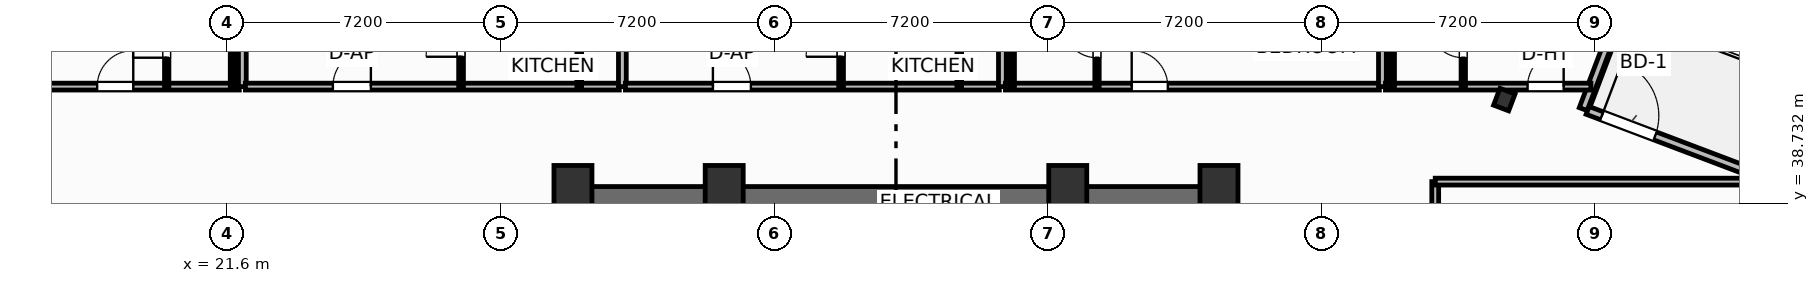
"""IFC4 building model, lengths in metres.
Left out: names, types, materials, properties, quantities, classifications, styles, units other than length and angle.
Written with IfcOpenShell. Run it as: python <this file> out.ifc"""

import sys

from ifc_helpers import new_model, si_unit, direction, frame, frame_2d, origin, origin_2d, place, context, subcontext, project, spatial, rectangle, i_section, extrude, element, fill, save


model = new_model("IFC4")
c1 = context("Model", 3, precision=1e-05, world=origin(), true_north=direction((0.0, 1.0)))
c2 = subcontext(c1, "Body", "Model", "MODEL_VIEW")
j1 = project(units=[si_unit("LENGTHUNIT", "METRE"), si_unit("PLANEANGLEUNIT", "RADIAN")], contexts=[c1])
p1 = place(None, origin())
s1 = spatial("IfcSite", under=j1, at=p1, CompositionType="ELEMENT")
p2 = place(p1, origin())
s2 = spatial("IfcBuilding", under=s1, at=p2, CompositionType="ELEMENT")
p3 = place(p2, frame((0.0, 0.0, 98.4)))
s3 = spatial("IfcBuildingStorey", under=s2, at=p3, CompositionType="ELEMENT", Elevation=98.4)
for number, where, z_axis, x_axis in (
    (1, (30.7, 39.05, 0.0), (0.0, 0.0, 1.0), (1.0, 0.0, 0.0)),
    (2, (34.68, 39.05, 0.0), (0.0, 0.0, 1.0), (1.0, 0.0, 0.0)),
    (3, (43.72, 39.05, 0.0), (0.0, 0.0, 1.0), (1.0, 0.0, 0.0)),
    (4, (47.7, 39.05, 0.0), (0.0, 0.0, 1.0), (1.0, 0.0, 0.0)),
):
    element("IfcColumn", number, at=place(p3, frame(where, z_axis=z_axis, x_axis=x_axis)), inside=s3, PredefinedType="COLUMN", context=c2, shape_type="SweptSolid", body=[
        extrude(rectangle(XDim=1.0, YDim=1.35, at=origin_2d()), origin(), (0.0, 0.0, 1.0), 3.7),
    ])
p4 = place(p3, frame((30.38, 38.795, 0.0), z_axis=(0.0, 0.0, 1.0), x_axis=(1.0, 0.0, 0.0)))
e5 = element("IfcWall", 5, at=p4, inside=s3, PredefinedType="SHEAR", context=c2, shape_type="SweptSolid", body=[
    extrude(rectangle(XDim=17.64, YDim=0.75, at=frame_2d((8.82, 0.0))), origin(), (0.0, 0.0, 1.0), 3.45),
])
p5 = place(p3, frame((55.208, 41.459, 0.0), z_axis=(0.0, 0.0, 1.0), x_axis=(0.935221751401, -0.354062530786, 0.0)))
e6 = element("IfcColumn", 6, at=p5, inside=s3, PredefinedType="COLUMN", context=c2, shape_type="SweptSolid", body=[
    extrude(i_section(OverallWidth=0.424, OverallDepth=0.474, WebThickness=0.048, FlangeThickness=0.077, FilletRadius=0.025, at=origin_2d()), origin(), (0.0, 0.0, 1.0), 3.7),
])
p6 = place(p3, frame((57.399, 41.175, 0.0), z_axis=(0.0, 0.0, 1.0), x_axis=(0.935227640088, -0.354046976001, 0.0)))
e7 = element("IfcWall", 7, at=p6, inside=s3, PredefinedType="SOLIDWALL", context=c2, shape_type="SweptSolid", body=[
    extrude(rectangle(XDim=6.0, YDim=0.22, at=frame_2d((3.0, 0.0))), origin(), (0.0, 0.0, 1.0), 2.73),
])
p7 = place(p6, frame((0.4, 0.0, 0.0)))
e8 = element("IfcOpeningElement", 8, at=p7, cuts=e7, PredefinedType="OPENING", context=c2, shape_type="SweptSolid", body=[
    extrude(rectangle(XDim=1.5, YDim=2.25, at=frame_2d((0.75, 1.125))), frame((0.0, 0.12, 0.0), z_axis=(0.0, -1.0, 0.0), x_axis=(1.0, 0.0, 0.0)), (0.0, 0.0, 1.0), 0.24),
])
p8 = place(p3, frame((57.284, 41.208, 0.0), z_axis=(0.0, 0.0, 1.0), x_axis=(0.354128469405, 0.935196785258, 0.0)))
e9 = element("IfcWall", 9, at=p8, inside=s3, PredefinedType="SOLIDWALL", context=c2, shape_type="SweptSolid", body=[
    extrude(rectangle(XDim=2.1, YDim=0.22, at=frame_2d((1.05, 0.0))), origin(), (0.0, 0.0, 1.0), 2.73),
])
p9 = place(p3, frame((5.646, 41.8, 0.0), z_axis=(0.0, 0.0, 1.0), x_axis=(1.0, 0.0, 0.0)))
e10 = element("IfcWall", 10, at=p9, inside=s3, PredefinedType="PARTITIONING", context=c2, shape_type="SweptSolid", body=[
    extrude(rectangle(XDim=16.274, YDim=0.18, at=frame_2d((8.137, 0.0))), origin(), (0.0, 0.0, 1.0), 3.45),
])
p10 = place(p9, frame((12.534, 0.0, 0.0)))
e11 = element("IfcOpeningElement", 11, at=p10, cuts=e10, PredefinedType="OPENING", context=c2, shape_type="SweptSolid", body=[
    extrude(rectangle(XDim=0.95, YDim=2.15, at=frame_2d((0.475, 1.075))), frame((0.0, 0.1, 0.0), z_axis=(0.0, -1.0, 0.0), x_axis=(1.0, 0.0, 0.0)), (0.0, 0.0, 1.0), 0.2),
])
p11 = place(p3, frame((20.01, 41.8, 0.0), z_axis=(0.0, 0.0, 1.0), x_axis=(0.0, 1.0, 0.0)))
e12 = element("IfcWall", 12, at=p11, inside=s3, PredefinedType="PARTITIONING", context=c2, shape_type="SweptSolid", body=[
    extrude(rectangle(XDim=2.52, YDim=0.115, at=frame_2d((1.26, 0.0))), origin(), (0.0, 0.0, 1.0), 3.45),
])
p12 = place(p11, frame((0.76, 0.0, 0.0)))
e13 = element("IfcOpeningElement", 13, at=p12, cuts=e12, PredefinedType="OPENING", context=c2, shape_type="SweptSolid", body=[
    extrude(rectangle(XDim=0.9, YDim=2.05, at=frame_2d((0.45, 1.025))), frame((0.0, 0.067, 0.0), z_axis=(0.0, -1.0, 0.0), x_axis=(1.0, 0.0, 0.0)), (0.0, 0.0, 1.0), 0.135),
])
p13 = place(p3, frame((21.74, 41.8, 0.0), z_axis=(0.0, 0.0, 1.0), x_axis=(0.0, 1.0, 0.0)))
e14 = element("IfcWall", 14, at=p13, inside=s3, PredefinedType="PARTITIONING", context=c2, shape_type="SweptSolid", body=[
    extrude(rectangle(XDim=2.52, YDim=0.115, at=frame_2d((1.26, 0.0))), origin(), (0.0, 0.0, 1.0), 3.45),
])
p14 = place(p3, frame((22.0, 41.8, 0.0), z_axis=(0.0, 0.0, 1.0), x_axis=(0.0, 1.0, 0.0)))
e15 = element("IfcWall", 15, at=p14, inside=s3, PredefinedType="PARTITIONING", context=c2, shape_type="SweptSolid", body=[
    extrude(rectangle(XDim=14.906, YDim=0.205, at=frame_2d((7.453, 0.0))), origin(), (0.0, 0.0, 1.0), 3.45),
])
p15 = place(p3, frame((22.08, 41.8, 0.0), z_axis=(0.0, 0.0, 1.0), x_axis=(1.0, 0.0, 0.0)))
e16 = element("IfcWall", 16, at=p15, inside=s3, PredefinedType="PARTITIONING", context=c2, shape_type="SweptSolid", body=[
    extrude(rectangle(XDim=9.84, YDim=0.18, at=frame_2d((4.92, 0.0))), origin(), (0.0, 0.0, 1.0), 3.45),
])
p16 = place(p15, frame((2.302, 0.0, 0.0)))
e17 = element("IfcOpeningElement", 17, at=p16, cuts=e16, PredefinedType="OPENING", context=c2, shape_type="SweptSolid", body=[
    extrude(rectangle(XDim=1.0, YDim=2.2, at=frame_2d((0.5, 1.1))), frame((0.0, 0.1, 0.0), z_axis=(0.0, -1.0, 0.0), x_axis=(1.0, 0.0, 0.0)), (0.0, 0.0, 1.0), 0.2),
])
p17 = place(p3, frame((27.755, 41.8, 0.0), z_axis=(0.0, 0.0, 1.0), x_axis=(0.0, 1.0, 0.0)))
e18 = element("IfcWall", 18, at=p17, inside=s3, PredefinedType="PARTITIONING", context=c2, shape_type="SweptSolid", body=[
    extrude(rectangle(XDim=12.811, YDim=0.125, at=frame_2d((6.405, 0.0))), origin(), (0.0, 0.0, 1.0), 3.45),
])
p18 = place(p17, frame((0.785, 0.0, 0.0)))
e19 = element("IfcOpeningElement", 19, at=p18, cuts=e18, PredefinedType="OPENING", context=c2, shape_type="SweptSolid", body=[
    extrude(rectangle(XDim=0.92, YDim=2.05, at=frame_2d((0.46, 1.025))), frame((0.0, 0.073, 0.0), z_axis=(0.0, -1.0, 0.0), x_axis=(1.0, 0.0, 0.0)), (0.0, 0.0, 1.0), 0.145),
])
p19 = place(p17, frame((3.037, 0.0, 0.0)))
e20 = element("IfcOpeningElement", 20, at=p19, cuts=e18, PredefinedType="OPENING", context=c2, shape_type="SweptSolid", body=[
    extrude(rectangle(XDim=0.9, YDim=2.05, at=frame_2d((0.45, 1.025))), frame((0.0, 0.073, 0.0), z_axis=(0.0, -1.0, 0.0), x_axis=(1.0, 0.0, 0.0)), (0.0, 0.0, 1.0), 0.145),
])
p20 = place(p17, frame((10.089, 0.0, 0.0)))
e21 = element("IfcOpeningElement", 21, at=p20, cuts=e18, PredefinedType="OPENING", context=c2, shape_type="SweptSolid", body=[
    extrude(rectangle(XDim=0.92, YDim=2.05, at=frame_2d((0.46, 1.025))), frame((0.0, 0.073, 0.0), z_axis=(0.0, -1.0, 0.0), x_axis=(1.0, 0.0, 0.0)), (0.0, 0.0, 1.0), 0.145),
])
p21 = place(p3, frame((30.865, 41.8, 0.0), z_axis=(0.0, 0.0, 1.0), x_axis=(0.0, 1.0, 0.0)))
e22 = element("IfcWall", 22, at=p21, inside=s3, PredefinedType="PARTITIONING", context=c2, shape_type="SweptSolid", body=[
    extrude(rectangle(XDim=2.41, YDim=0.125, at=frame_2d((1.205, 0.0))), origin(), (0.0, 0.0, 1.0), 3.45),
])
p22 = place(p3, frame((32.0, 41.8, 0.0), z_axis=(0.0, 0.0, 1.0), x_axis=(0.0, 1.0, 0.0)))
e23 = element("IfcWall", 23, at=p22, inside=s3, PredefinedType="PARTITIONING", context=c2, shape_type="SweptSolid", body=[
    extrude(rectangle(XDim=8.958, YDim=0.205, at=frame_2d((4.479, 0.0))), origin(), (0.0, 0.0, 1.0), 3.45),
])
p23 = place(p3, frame((32.08, 41.8, 0.0), z_axis=(0.0, 0.0, 1.0), x_axis=(1.0, 0.0, 0.0)))
e24 = element("IfcWall", 24, at=p23, inside=s3, PredefinedType="PARTITIONING", context=c2, shape_type="SweptSolid", body=[
    extrude(rectangle(XDim=9.84, YDim=0.18, at=frame_2d((4.92, 0.0))), origin(), (0.0, 0.0, 1.0), 3.45),
])
p24 = place(p23, frame((2.302, 0.0, 0.0)))
e25 = element("IfcOpeningElement", 25, at=p24, cuts=e24, PredefinedType="OPENING", context=c2, shape_type="SweptSolid", body=[
    extrude(rectangle(XDim=1.0, YDim=2.2, at=frame_2d((0.5, 1.1))), frame((0.0, 0.1, 0.0), z_axis=(0.0, -1.0, 0.0), x_axis=(1.0, 0.0, 0.0)), (0.0, 0.0, 1.0), 0.2),
])
p25 = place(p3, frame((37.755, 41.8, 0.0), z_axis=(0.0, 0.0, 1.0), x_axis=(0.0, 1.0, 0.0)))
e26 = element("IfcWall", 26, at=p25, inside=s3, PredefinedType="PARTITIONING", context=c2, shape_type="SweptSolid", body=[
    extrude(rectangle(XDim=9.025, YDim=0.125, at=frame_2d((4.512, 0.0))), origin(), (0.0, 0.0, 1.0), 3.45),
])
p26 = place(p25, frame((0.785, 0.0, 0.0)))
e27 = element("IfcOpeningElement", 27, at=p26, cuts=e26, PredefinedType="OPENING", context=c2, shape_type="SweptSolid", body=[
    extrude(rectangle(XDim=0.92, YDim=2.05, at=frame_2d((0.46, 1.025))), frame((0.0, 0.073, 0.0), z_axis=(0.0, -1.0, 0.0), x_axis=(1.0, 0.0, 0.0)), (0.0, 0.0, 1.0), 0.145),
])
p27 = place(p25, frame((3.037, 0.0, 0.0)))
e28 = element("IfcOpeningElement", 28, at=p27, cuts=e26, PredefinedType="OPENING", context=c2, shape_type="SweptSolid", body=[
    extrude(rectangle(XDim=0.9, YDim=2.05, at=frame_2d((0.45, 1.025))), frame((0.0, 0.073, 0.0), z_axis=(0.0, -1.0, 0.0), x_axis=(1.0, 0.0, 0.0)), (0.0, 0.0, 1.0), 0.145),
])
p28 = place(p25, frame((6.678, 0.0, 0.0)))
e29 = element("IfcOpeningElement", 29, at=p28, cuts=e26, PredefinedType="OPENING", context=c2, shape_type="SweptSolid", body=[
    extrude(rectangle(XDim=0.92, YDim=2.05, at=frame_2d((0.46, 1.025))), frame((0.0, 0.073, 0.0), z_axis=(0.0, -1.0, 0.0), x_axis=(1.0, 0.0, 0.0)), (0.0, 0.0, 1.0), 0.145),
])
p29 = place(p3, frame((40.865, 41.8, 0.0), z_axis=(0.0, 0.0, 1.0), x_axis=(0.0, 1.0, 0.0)))
e30 = element("IfcWall", 30, at=p29, inside=s3, PredefinedType="PARTITIONING", context=c2, shape_type="SweptSolid", body=[
    extrude(rectangle(XDim=2.41, YDim=0.125, at=frame_2d((1.205, 0.0))), origin(), (0.0, 0.0, 1.0), 3.45),
])
p30 = place(p3, frame((42.0, 41.8, 0.0), z_axis=(0.0, 0.0, 1.0), x_axis=(0.0, 1.0, 0.0)))
e31 = element("IfcWall", 31, at=p30, inside=s3, PredefinedType="PARTITIONING", context=c2, shape_type="SweptSolid", body=[
    extrude(rectangle(XDim=7.418, YDim=0.205, at=frame_2d((3.709, 0.0))), origin(), (0.0, 0.0, 1.0), 3.45),
])
p31 = place(p3, frame((42.08, 41.8, 0.0), z_axis=(0.0, 0.0, 1.0), x_axis=(1.0, 0.0, 0.0)))
e32 = element("IfcWall", 32, at=p31, inside=s3, PredefinedType="PARTITIONING", context=c2, shape_type="SweptSolid", body=[
    extrude(rectangle(XDim=9.84, YDim=0.18, at=frame_2d((4.92, 0.0))), origin(), (0.0, 0.0, 1.0), 3.45),
])
p32 = place(p31, frame((3.323, 0.0, 0.0)))
e33 = element("IfcOpeningElement", 33, at=p32, cuts=e32, PredefinedType="OPENING", context=c2, shape_type="SweptSolid", body=[
    extrude(rectangle(XDim=0.95, YDim=2.15, at=frame_2d((0.475, 1.075))), frame((0.0, 0.1, 0.0), z_axis=(0.0, -1.0, 0.0), x_axis=(1.0, 0.0, 0.0)), (0.0, 0.0, 1.0), 0.2),
])
p33 = place(p3, frame((44.49, 41.8, 0.0), z_axis=(0.0, 0.0, 1.0), x_axis=(0.0, 1.0, 0.0)))
e34 = element("IfcWall", 34, at=p33, inside=s3, PredefinedType="PARTITIONING", context=c2, shape_type="SweptSolid", body=[
    extrude(rectangle(XDim=2.52, YDim=0.115, at=frame_2d((1.26, 0.0))), origin(), (0.0, 0.0, 1.0), 3.45),
])
p34 = place(p33, frame((0.76, 0.0, 0.0)))
e35 = element("IfcOpeningElement", 35, at=p34, cuts=e34, PredefinedType="OPENING", context=c2, shape_type="SweptSolid", body=[
    extrude(rectangle(XDim=0.9, YDim=2.05, at=frame_2d((0.45, 1.025))), frame((0.0, 0.067, 0.0), z_axis=(0.0, -1.0, 0.0), x_axis=(1.0, 0.0, 0.0)), (0.0, 0.0, 1.0), 0.135),
])
p35 = place(p3, frame((42.26, 41.8, 0.0), z_axis=(0.0, 0.0, 1.0), x_axis=(0.0, 1.0, 0.0)))
e36 = element("IfcWall", 36, at=p35, inside=s3, PredefinedType="PARTITIONING", context=c2, shape_type="SweptSolid", body=[
    extrude(rectangle(XDim=2.52, YDim=0.115, at=frame_2d((1.26, 0.0))), origin(), (0.0, 0.0, 1.0), 3.45),
])
p36 = place(p3, frame((52.0, 41.8, 0.0), z_axis=(0.0, 0.0, 1.0), x_axis=(0.0, 1.0, 0.0)))
e37 = element("IfcWall", 37, at=p36, inside=s3, PredefinedType="PARTITIONING", context=c2, shape_type="SweptSolid", body=[
    extrude(rectangle(XDim=3.632, YDim=0.205, at=frame_2d((1.816, 0.0))), origin(), (0.0, 0.0, 1.0), 3.45),
])
p37 = place(p3, frame((52.08, 41.8, 0.0), z_axis=(0.0, 0.0, 1.0), x_axis=(1.0, 0.0, 0.0)))
e38 = element("IfcWall", 38, at=p37, inside=s3, PredefinedType="PARTITIONING", context=c2, shape_type="SweptSolid", body=[
    extrude(rectangle(XDim=5.406, YDim=0.18, at=frame_2d((2.703, 0.0))), origin(), (0.0, 0.0, 1.0), 3.45),
])
p38 = place(p37, frame((3.74, 0.0, 0.0)))
e39 = element("IfcOpeningElement", 39, at=p38, cuts=e38, PredefinedType="OPENING", context=c2, shape_type="SweptSolid", body=[
    extrude(rectangle(XDim=0.95, YDim=2.15, at=frame_2d((0.475, 1.075))), frame((0.0, 0.1, 0.0), z_axis=(0.0, -1.0, 0.0), x_axis=(1.0, 0.0, 0.0)), (0.0, 0.0, 1.0), 0.2),
])
p39 = place(p3, frame((54.128, 41.8, 0.0), z_axis=(0.0, 0.0, 1.0), x_axis=(0.0, 1.0, 0.0)))
e40 = element("IfcWall", 40, at=p39, inside=s3, PredefinedType="PARTITIONING", context=c2, shape_type="SweptSolid", body=[
    extrude(rectangle(XDim=2.52, YDim=0.115, at=frame_2d((1.26, 0.0))), origin(), (0.0, 0.0, 1.0), 3.45),
])
p40 = place(p39, frame((0.76, 0.0, 0.0)))
e41 = element("IfcOpeningElement", 41, at=p40, cuts=e40, PredefinedType="OPENING", context=c2, shape_type="SweptSolid", body=[
    extrude(rectangle(XDim=0.9, YDim=2.05, at=frame_2d((0.45, 1.025))), frame((0.0, 0.067, 0.0), z_axis=(0.0, -1.0, 0.0), x_axis=(1.0, 0.0, 0.0)), (0.0, 0.0, 1.0), 0.135),
])
p41 = place(p3, frame((52.26, 41.8, 0.0), z_axis=(0.0, 0.0, 1.0), x_axis=(0.0, 1.0, 0.0)))
e42 = element("IfcWall", 42, at=p41, inside=s3, PredefinedType="PARTITIONING", context=c2, shape_type="SweptSolid", body=[
    extrude(rectangle(XDim=2.52, YDim=0.115, at=frame_2d((1.26, 0.0))), origin(), (0.0, 0.0, 1.0), 3.45),
])
p42 = place(p3, frame((53.39, 26.84, 0.0), z_axis=(0.0, 0.0, 1.0), x_axis=(0.0, 1.0, 0.0)))
e43 = element("IfcWall", 43, at=p42, inside=s3, PredefinedType="PARTITIONING", context=c2, shape_type="SweptSolid", body=[
    extrude(rectangle(XDim=12.46, YDim=0.18, at=frame_2d((6.23, 0.0))), origin(), (0.0, 0.0, 1.0), 3.45),
])
p43 = place(p42, frame((0.618, 0.0, 0.0)))
e44 = element("IfcOpeningElement", 44, at=p43, cuts=e43, PredefinedType="OPENING", context=c2, shape_type="SweptSolid", body=[
    extrude(rectangle(XDim=0.92, YDim=2.05, at=frame_2d((0.46, 1.025))), frame((0.0, 0.1, 0.0), z_axis=(0.0, -1.0, 0.0), x_axis=(1.0, 0.0, 0.0)), (0.0, 0.0, 1.0), 0.2),
])
p44 = place(p3, frame((53.39, 39.3, 0.0), z_axis=(0.0, 0.0, 1.0), x_axis=(1.0, 0.0, 0.0)))
e45 = element("IfcWall", 45, at=p44, inside=s3, PredefinedType="PARTITIONING", context=c2, shape_type="SweptSolid", body=[
    extrude(rectangle(XDim=8.876, YDim=0.18, at=frame_2d((4.438, 0.0))), origin(), (0.0, 0.0, 1.0), 3.45),
])
p45 = place(p7, origin())
e46 = element("IfcDoor", 46, at=p45, inside=s3, OperationType="SINGLE_SWING_LEFT", PredefinedType="DOOR", context=c2, shape_type="SweptSolid", body=[
    extrude(rectangle(XDim=1.5, YDim=2.25, at=frame_2d((0.75, 1.125))), frame((0.0, 0.025, 0.0), z_axis=(0.0, -1.0, 0.0), x_axis=(1.0, 0.0, 0.0)), (0.0, 0.0, 1.0), 0.05),
])
fill(e8, e46)
p46 = place(p10, origin())
e47 = element("IfcDoor", 47, at=p46, inside=s3, OperationType="SINGLE_SWING_RIGHT", PredefinedType="DOOR", context=c2, shape_type="SweptSolid", body=[
    extrude(rectangle(XDim=0.95, YDim=2.15, at=frame_2d((0.475, 1.075))), frame((0.0, 0.025, 0.0), z_axis=(0.0, -1.0, 0.0), x_axis=(1.0, 0.0, 0.0)), (0.0, 0.0, 1.0), 0.05),
])
fill(e11, e47)
p47 = place(p12, origin())
e48 = element("IfcDoor", 48, at=p47, inside=s3, OperationType="SINGLE_SWING_LEFT", PredefinedType="DOOR", context=c2, shape_type="SweptSolid", body=[
    extrude(rectangle(XDim=0.9, YDim=2.05, at=frame_2d((0.45, 1.025))), frame((0.0, 0.025, 0.0), z_axis=(0.0, -1.0, 0.0), x_axis=(1.0, 0.0, 0.0)), (0.0, 0.0, 1.0), 0.05),
])
fill(e13, e48)
p48 = place(p16, origin())
e49 = element("IfcDoor", 49, at=p48, inside=s3, OperationType="SINGLE_SWING_RIGHT", PredefinedType="DOOR", context=c2, shape_type="SweptSolid", body=[
    extrude(rectangle(XDim=1.0, YDim=2.2, at=frame_2d((0.5, 1.1))), frame((0.0, 0.025, 0.0), z_axis=(0.0, -1.0, 0.0), x_axis=(1.0, 0.0, 0.0)), (0.0, 0.0, 1.0), 0.05),
])
fill(e17, e49)
p49 = place(p18, origin())
e50 = element("IfcDoor", 50, at=p49, inside=s3, OperationType="SINGLE_SWING_LEFT", PredefinedType="DOOR", context=c2, shape_type="SweptSolid", body=[
    extrude(rectangle(XDim=0.92, YDim=2.05, at=frame_2d((0.46, 1.025))), frame((0.0, 0.025, 0.0), z_axis=(0.0, -1.0, 0.0), x_axis=(1.0, 0.0, 0.0)), (0.0, 0.0, 1.0), 0.05),
])
fill(e19, e50)
p50 = place(p24, origin())
e51 = element("IfcDoor", 51, at=p50, inside=s3, OperationType="SINGLE_SWING_LEFT", PredefinedType="DOOR", context=c2, shape_type="SweptSolid", body=[
    extrude(rectangle(XDim=1.0, YDim=2.2, at=frame_2d((0.5, 1.1))), frame((0.0, 0.025, 0.0), z_axis=(0.0, -1.0, 0.0), x_axis=(1.0, 0.0, 0.0)), (0.0, 0.0, 1.0), 0.05),
])
fill(e25, e51)
p51 = place(p26, origin())
e52 = element("IfcDoor", 52, at=p51, inside=s3, OperationType="SINGLE_SWING_LEFT", PredefinedType="DOOR", context=c2, shape_type="SweptSolid", body=[
    extrude(rectangle(XDim=0.92, YDim=2.05, at=frame_2d((0.46, 1.025))), frame((0.0, 0.025, 0.0), z_axis=(0.0, -1.0, 0.0), x_axis=(1.0, 0.0, 0.0)), (0.0, 0.0, 1.0), 0.05),
])
fill(e27, e52)
p52 = place(p32, origin())
e53 = element("IfcDoor", 53, at=p52, inside=s3, OperationType="SINGLE_SWING_LEFT", PredefinedType="DOOR", context=c2, shape_type="SweptSolid", body=[
    extrude(rectangle(XDim=0.95, YDim=2.15, at=frame_2d((0.475, 1.075))), frame((0.0, 0.025, 0.0), z_axis=(0.0, -1.0, 0.0), x_axis=(1.0, 0.0, 0.0)), (0.0, 0.0, 1.0), 0.05),
])
fill(e33, e53)
p53 = place(p34, origin())
e54 = element("IfcDoor", 54, at=p53, inside=s3, OperationType="SINGLE_SWING_RIGHT", PredefinedType="DOOR", context=c2, shape_type="SweptSolid", body=[
    extrude(rectangle(XDim=0.9, YDim=2.05, at=frame_2d((0.45, 1.025))), frame((0.0, 0.025, 0.0), z_axis=(0.0, -1.0, 0.0), x_axis=(1.0, 0.0, 0.0)), (0.0, 0.0, 1.0), 0.05),
])
fill(e35, e54)
p54 = place(p38, origin())
e55 = element("IfcDoor", 55, at=p54, inside=s3, OperationType="SINGLE_SWING_RIGHT", PredefinedType="DOOR", context=c2, shape_type="SweptSolid", body=[
    extrude(rectangle(XDim=0.95, YDim=2.15, at=frame_2d((0.475, 1.075))), frame((0.0, 0.025, 0.0), z_axis=(0.0, -1.0, 0.0), x_axis=(1.0, 0.0, 0.0)), (0.0, 0.0, 1.0), 0.05),
])
fill(e39, e55)
p55 = place(p40, origin())
e56 = element("IfcDoor", 56, at=p55, inside=s3, OperationType="SINGLE_SWING_RIGHT", PredefinedType="DOOR", context=c2, shape_type="SweptSolid", body=[
    extrude(rectangle(XDim=0.9, YDim=2.05, at=frame_2d((0.45, 1.025))), frame((0.0, 0.025, 0.0), z_axis=(0.0, -1.0, 0.0), x_axis=(1.0, 0.0, 0.0)), (0.0, 0.0, 1.0), 0.05),
])
fill(e41, e56)
save(model, sys.argv[1])
